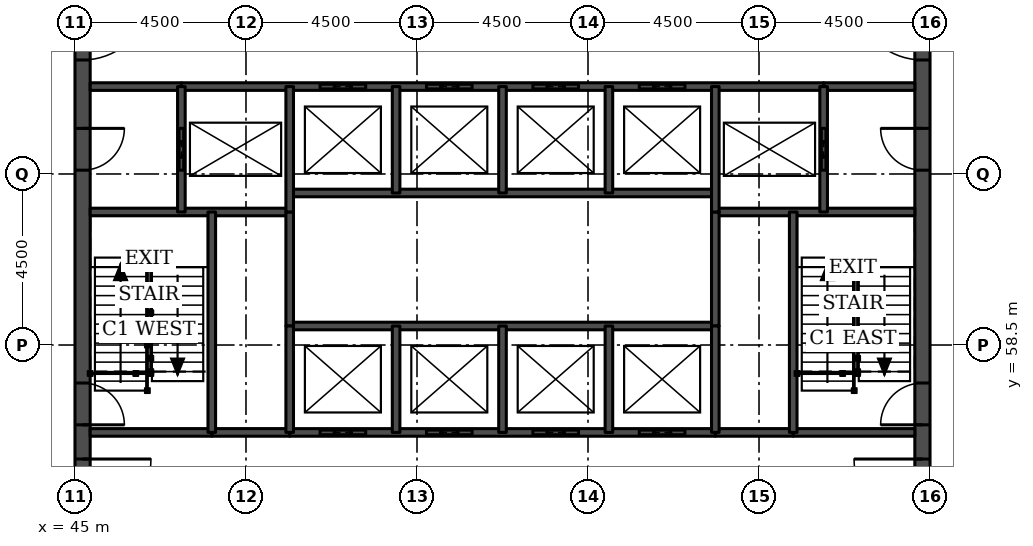
"""IFC4 building model, lengths in metres.
Left out: names, types, materials, properties, quantities, classifications, styles, units other than length and angle.
Written with IfcOpenShell. Run it as: python <this file> out.ifc"""

import sys

from ifc_helpers import new_model, si_unit, direction, frame, frame_2d, origin, place, context, subcontext, project, spatial, rectangle, extrude, element, fill, save


model = new_model("IFC4")
c1 = context("Model", 3, precision=1e-05, world=origin(), true_north=direction((0.0, 1.0)))
c2 = subcontext(c1, "Body", "Model", "MODEL_VIEW")
j1 = project(units=[si_unit("LENGTHUNIT", "METRE"), si_unit("PLANEANGLEUNIT", "RADIAN")], contexts=[c1])
p1 = place(None, origin())
s1 = spatial("IfcSite", under=j1, at=p1, CompositionType="ELEMENT")
p2 = place(p1, origin())
s2 = spatial("IfcBuilding", under=s1, at=p2, CompositionType="ELEMENT")
p3 = place(p2, frame((0.0, 0.0, 203.2)))
s3 = spatial("IfcBuildingStorey", under=s2, at=p3, CompositionType="ELEMENT", Elevation=203.2)
p4 = place(p3, frame((45.2, 49.5, 0.0), z_axis=(0.0, 0.0, 1.0), x_axis=(0.0, 1.0, 0.0)))
e1 = element("IfcWall", 1, at=p4, inside=s3, PredefinedType="SHEAR", context=c2, shape_type="SweptSolid", body=[
    extrude(rectangle(XDim=22.5, YDim=0.4, at=frame_2d((11.25, 0.0))), origin(), (0.0, 0.0, 1.0), 3.7),
])
p5 = place(p4, frame((4.2, 0.0, 0.0)))
e2 = element("IfcOpeningElement", 2, at=p5, cuts=e1, PredefinedType="OPENING", context=c2, shape_type="SweptSolid", body=[
    extrude(rectangle(XDim=1.8, YDim=2.1, at=frame_2d((0.9, 1.05))), frame((0.0, 0.21, 0.0), z_axis=(0.0, -1.0, 0.0), x_axis=(1.0, 0.0, 0.0)), (0.0, 0.0, 1.0), 0.42),
])
p6 = place(p4, frame((6.9, 0.0, 0.0)))
e3 = element("IfcOpeningElement", 3, at=p6, cuts=e1, PredefinedType="OPENING", context=c2, shape_type="SweptSolid", body=[
    extrude(rectangle(XDim=1.1, YDim=2.1, at=frame_2d((0.55, 1.05))), frame((0.0, 0.21, 0.0), z_axis=(0.0, -1.0, 0.0), x_axis=(1.0, 0.0, 0.0)), (0.0, 0.0, 1.0), 0.42),
])
p7 = place(p4, frame((13.6, 0.0, 0.0)))
e4 = element("IfcOpeningElement", 4, at=p7, cuts=e1, PredefinedType="OPENING", context=c2, shape_type="SweptSolid", body=[
    extrude(rectangle(XDim=1.1, YDim=2.1, at=frame_2d((0.55, 1.05))), frame((0.0, 0.21, 0.0), z_axis=(0.0, -1.0, 0.0), x_axis=(1.0, 0.0, 0.0)), (0.0, 0.0, 1.0), 0.42),
])
p8 = place(p4, frame((16.5, 0.0, 0.0)))
e5 = element("IfcOpeningElement", 5, at=p8, cuts=e1, PredefinedType="OPENING", context=c2, shape_type="SweptSolid", body=[
    extrude(rectangle(XDim=1.8, YDim=2.1, at=frame_2d((0.9, 1.05))), frame((0.0, 0.21, 0.0), z_axis=(0.0, -1.0, 0.0), x_axis=(1.0, 0.0, 0.0)), (0.0, 0.0, 1.0), 0.42),
])
p9 = place(p3, frame((67.3, 49.5, 0.0), z_axis=(0.0, 0.0, 1.0), x_axis=(0.0, 1.0, 0.0)))
e6 = element("IfcWall", 6, at=p9, inside=s3, PredefinedType="SHEAR", context=c2, shape_type="SweptSolid", body=[
    extrude(rectangle(XDim=22.5, YDim=0.4, at=frame_2d((11.25, 0.0))), origin(), (0.0, 0.0, 1.0), 3.7),
])
p10 = place(p9, frame((4.2, 0.0, 0.0)))
e7 = element("IfcOpeningElement", 7, at=p10, cuts=e6, PredefinedType="OPENING", context=c2, shape_type="SweptSolid", body=[
    extrude(rectangle(XDim=1.8, YDim=2.1, at=frame_2d((0.9, 1.05))), frame((0.0, 0.21, 0.0), z_axis=(0.0, -1.0, 0.0), x_axis=(1.0, 0.0, 0.0)), (0.0, 0.0, 1.0), 0.42),
])
p11 = place(p9, frame((6.9, 0.0, 0.0)))
e8 = element("IfcOpeningElement", 8, at=p11, cuts=e6, PredefinedType="OPENING", context=c2, shape_type="SweptSolid", body=[
    extrude(rectangle(XDim=1.1, YDim=2.1, at=frame_2d((0.55, 1.05))), frame((0.0, 0.21, 0.0), z_axis=(0.0, -1.0, 0.0), x_axis=(1.0, 0.0, 0.0)), (0.0, 0.0, 1.0), 0.42),
])
p12 = place(p9, frame((13.6, 0.0, 0.0)))
e9 = element("IfcOpeningElement", 9, at=p12, cuts=e6, PredefinedType="OPENING", context=c2, shape_type="SweptSolid", body=[
    extrude(rectangle(XDim=1.1, YDim=2.1, at=frame_2d((0.55, 1.05))), frame((0.0, 0.21, 0.0), z_axis=(0.0, -1.0, 0.0), x_axis=(1.0, 0.0, 0.0)), (0.0, 0.0, 1.0), 0.42),
])
p13 = place(p9, frame((16.5, 0.0, 0.0)))
e10 = element("IfcOpeningElement", 10, at=p13, cuts=e6, PredefinedType="OPENING", context=c2, shape_type="SweptSolid", body=[
    extrude(rectangle(XDim=1.8, YDim=2.1, at=frame_2d((0.9, 1.05))), frame((0.0, 0.21, 0.0), z_axis=(0.0, -1.0, 0.0), x_axis=(1.0, 0.0, 0.0)), (0.0, 0.0, 1.0), 0.42),
])
for number, where, z_axis, x_axis in (
    (11, (48.6, 56.2, 0.0), (0.0, 0.0, 1.0), (1.0, 0.0, 0.0)),
    (12, (61.85, 56.2, 0.0), (0.0, 0.0, 1.0), (1.0, 0.0, 0.0)),
):
    element("IfcWall", number, at=place(p3, frame(where, z_axis=z_axis, x_axis=x_axis)), inside=s3, PredefinedType="SOLIDWALL", context=c2, shape_type="SweptSolid", body=[
        extrude(rectangle(XDim=2.05, YDim=0.2, at=frame_2d((1.025, 0.0))), origin(), (0.0, 0.0, 1.0), 3.55),
    ])
p14 = place(p3, frame((45.4, 56.2, 0.0), z_axis=(0.0, 0.0, 1.0), x_axis=(1.0, 0.0, 0.0)))
e13 = element("IfcWall", 13, at=p14, inside=s3, PredefinedType="SOLIDWALL", context=c2, shape_type="SweptSolid", body=[
    extrude(rectangle(XDim=3.2, YDim=0.2, at=frame_2d((1.6, 0.0))), origin(), (0.0, 0.0, 1.0), 3.55),
])
p15 = place(p3, frame((50.65, 56.2, 0.0), z_axis=(0.0, 0.0, 1.0), x_axis=(1.0, 0.0, 0.0)))
e14 = element("IfcWall", 14, at=p15, inside=s3, PredefinedType="SOLIDWALL", context=c2, shape_type="SweptSolid", body=[
    extrude(rectangle(XDim=11.2, YDim=0.2, at=frame_2d((5.6, 0.0))), origin(), (0.0, 0.0, 1.0), 3.55),
])
p16 = place(p15, frame((0.8, 0.0, 0.0)))
e15 = element("IfcOpeningElement", 15, at=p16, cuts=e14, PredefinedType="OPENING", context=c2, shape_type="SweptSolid", body=[
    extrude(rectangle(XDim=1.2, YDim=2.1, at=frame_2d((0.6, 1.05))), frame((0.0, 0.11, 0.0), z_axis=(0.0, -1.0, 0.0), x_axis=(1.0, 0.0, 0.0)), (0.0, 0.0, 1.0), 0.22),
])
p17 = place(p15, frame((3.6, 0.0, 0.0)))
e16 = element("IfcOpeningElement", 16, at=p17, cuts=e14, PredefinedType="OPENING", context=c2, shape_type="SweptSolid", body=[
    extrude(rectangle(XDim=1.2, YDim=2.1, at=frame_2d((0.6, 1.05))), frame((0.0, 0.11, 0.0), z_axis=(0.0, -1.0, 0.0), x_axis=(1.0, 0.0, 0.0)), (0.0, 0.0, 1.0), 0.22),
])
p18 = place(p15, frame((6.4, 0.0, 0.0)))
e17 = element("IfcOpeningElement", 17, at=p18, cuts=e14, PredefinedType="OPENING", context=c2, shape_type="SweptSolid", body=[
    extrude(rectangle(XDim=1.2, YDim=2.1, at=frame_2d((0.6, 1.05))), frame((0.0, 0.11, 0.0), z_axis=(0.0, -1.0, 0.0), x_axis=(1.0, 0.0, 0.0)), (0.0, 0.0, 1.0), 0.22),
])
p19 = place(p15, frame((9.2, 0.0, 0.0)))
e18 = element("IfcOpeningElement", 18, at=p19, cuts=e14, PredefinedType="OPENING", context=c2, shape_type="SweptSolid", body=[
    extrude(rectangle(XDim=1.2, YDim=2.1, at=frame_2d((0.6, 1.05))), frame((0.0, 0.11, 0.0), z_axis=(0.0, -1.0, 0.0), x_axis=(1.0, 0.0, 0.0)), (0.0, 0.0, 1.0), 0.22),
])
p20 = place(p3, frame((63.9, 56.2, 0.0), z_axis=(0.0, 0.0, 1.0), x_axis=(1.0, 0.0, 0.0)))
e19 = element("IfcWall", 19, at=p20, inside=s3, PredefinedType="SOLIDWALL", context=c2, shape_type="SweptSolid", body=[
    extrude(rectangle(XDim=3.2, YDim=0.2, at=frame_2d((1.6, 0.0))), origin(), (0.0, 0.0, 1.0), 3.55),
])
p21 = place(p3, frame((50.65, 59.0, 0.0), z_axis=(0.0, 0.0, 1.0), x_axis=(1.0, 0.0, 0.0)))
e20 = element("IfcWall", 20, at=p21, inside=s3, PredefinedType="SOLIDWALL", context=c2, shape_type="SweptSolid", body=[
    extrude(rectangle(XDim=11.2, YDim=0.2, at=frame_2d((5.6, 0.0))), origin(), (0.0, 0.0, 1.0), 3.7),
])
for number, where, z_axis, x_axis in (
    (21, (45.4, 62.0, 0.0), (0.0, 0.0, 1.0), (1.0, 0.0, 0.0)),
    (22, (61.85, 62.0, 0.0), (0.0, 0.0, 1.0), (1.0, 0.0, 0.0)),
):
    element("IfcWall", number, at=place(p3, frame(where, z_axis=z_axis, x_axis=x_axis)), inside=s3, PredefinedType="SOLIDWALL", context=c2, shape_type="SweptSolid", body=[
        extrude(rectangle(XDim=5.25, YDim=0.2, at=frame_2d((2.625, 0.0))), origin(), (0.0, 0.0, 1.0), 3.55),
    ])
p22 = place(p3, frame((50.65, 62.5, 0.0), z_axis=(0.0, 0.0, 1.0), x_axis=(1.0, 0.0, 0.0)))
e23 = element("IfcWall", 23, at=p22, inside=s3, PredefinedType="SOLIDWALL", context=c2, shape_type="SweptSolid", body=[
    extrude(rectangle(XDim=11.2, YDim=0.2, at=frame_2d((5.6, 0.0))), origin(), (0.0, 0.0, 1.0), 3.7),
])
for number, where, z_axis, x_axis in (
    (24, (45.4, 65.3, 0.0), (0.0, 0.0, 1.0), (1.0, 0.0, 0.0)),
    (25, (64.7, 65.3, 0.0), (0.0, 0.0, 1.0), (1.0, 0.0, 0.0)),
):
    element("IfcWall", number, at=place(p3, frame(where, z_axis=z_axis, x_axis=x_axis)), inside=s3, PredefinedType="SOLIDWALL", context=c2, shape_type="SweptSolid", body=[
        extrude(rectangle(XDim=2.4, YDim=0.2, at=frame_2d((1.2, 0.0))), origin(), (0.0, 0.0, 1.0), 3.55),
    ])
p23 = place(p3, frame((47.8, 65.3, 0.0), z_axis=(0.0, 0.0, 1.0), x_axis=(1.0, 0.0, 0.0)))
e26 = element("IfcWall", 26, at=p23, inside=s3, PredefinedType="SOLIDWALL", context=c2, shape_type="SweptSolid", body=[
    extrude(rectangle(XDim=16.9, YDim=0.2, at=frame_2d((8.45, 0.0))), origin(), (0.0, 0.0, 1.0), 3.55),
])
p24 = place(p23, frame((3.65, 0.0, 0.0)))
e27 = element("IfcOpeningElement", 27, at=p24, cuts=e26, PredefinedType="OPENING", context=c2, shape_type="SweptSolid", body=[
    extrude(rectangle(XDim=1.2, YDim=2.1, at=frame_2d((0.6, 1.05))), frame((0.0, 0.11, 0.0), z_axis=(0.0, -1.0, 0.0), x_axis=(1.0, 0.0, 0.0)), (0.0, 0.0, 1.0), 0.22),
])
p25 = place(p23, frame((6.45, 0.0, 0.0)))
e28 = element("IfcOpeningElement", 28, at=p25, cuts=e26, PredefinedType="OPENING", context=c2, shape_type="SweptSolid", body=[
    extrude(rectangle(XDim=1.2, YDim=2.1, at=frame_2d((0.6, 1.05))), frame((0.0, 0.11, 0.0), z_axis=(0.0, -1.0, 0.0), x_axis=(1.0, 0.0, 0.0)), (0.0, 0.0, 1.0), 0.22),
])
p26 = place(p23, frame((9.25, 0.0, 0.0)))
e29 = element("IfcOpeningElement", 29, at=p26, cuts=e26, PredefinedType="OPENING", context=c2, shape_type="SweptSolid", body=[
    extrude(rectangle(XDim=1.2, YDim=2.1, at=frame_2d((0.6, 1.05))), frame((0.0, 0.11, 0.0), z_axis=(0.0, -1.0, 0.0), x_axis=(1.0, 0.0, 0.0)), (0.0, 0.0, 1.0), 0.22),
])
p27 = place(p23, frame((12.05, 0.0, 0.0)))
e30 = element("IfcOpeningElement", 30, at=p27, cuts=e26, PredefinedType="OPENING", context=c2, shape_type="SweptSolid", body=[
    extrude(rectangle(XDim=1.2, YDim=2.1, at=frame_2d((0.6, 1.05))), frame((0.0, 0.11, 0.0), z_axis=(0.0, -1.0, 0.0), x_axis=(1.0, 0.0, 0.0)), (0.0, 0.0, 1.0), 0.22),
])
p28 = place(p3, frame((47.8, 62.0, 0.0), z_axis=(0.0, 0.0, 1.0), x_axis=(0.0, 1.0, 0.0)))
e31 = element("IfcWall", 31, at=p28, inside=s3, PredefinedType="SOLIDWALL", context=c2, shape_type="SweptSolid", body=[
    extrude(rectangle(XDim=3.3, YDim=0.2, at=frame_2d((1.65, 0.0))), origin(), (0.0, 0.0, 1.0), 3.55),
])
p29 = place(p28, frame((1.1, 0.0, 0.0)))
e32 = element("IfcOpeningElement", 32, at=p29, cuts=e31, PredefinedType="OPENING", context=c2, shape_type="SweptSolid", body=[
    extrude(rectangle(XDim=1.1, YDim=2.1, at=frame_2d((0.55, 1.05))), frame((0.0, 0.11, 0.0), z_axis=(0.0, -1.0, 0.0), x_axis=(1.0, 0.0, 0.0)), (0.0, 0.0, 1.0), 0.22),
])
p30 = place(p3, frame((48.6, 56.2, 0.0), z_axis=(0.0, 0.0, 1.0), x_axis=(0.0, 1.0, 0.0)))
e33 = element("IfcWall", 33, at=p30, inside=s3, PredefinedType="SOLIDWALL", context=c2, shape_type="SweptSolid", body=[
    extrude(rectangle(XDim=5.8, YDim=0.2, at=frame_2d((2.9, 0.0))), origin(), (0.0, 0.0, 1.0), 3.55),
])
p31 = place(p3, frame((50.65, 59.0, 0.0), z_axis=(0.0, 0.0, 1.0), x_axis=(0.0, 1.0, 0.0)))
e34 = element("IfcWall", 34, at=p31, inside=s3, PredefinedType="SOLIDWALL", context=c2, shape_type="SweptSolid", body=[
    extrude(rectangle(XDim=3.0, YDim=0.2, at=frame_2d((1.5, 0.0))), origin(), (0.0, 0.0, 1.0), 3.7),
])
p32 = place(p3, frame((50.65, 56.2, 0.0), z_axis=(0.0, 0.0, 1.0), x_axis=(0.0, 1.0, 0.0)))
e35 = element("IfcWall", 35, at=p32, inside=s3, PredefinedType="SOLIDWALL", context=c2, shape_type="SweptSolid", body=[
    extrude(rectangle(XDim=2.8, YDim=0.2, at=frame_2d((1.4, 0.0))), origin(), (0.0, 0.0, 1.0), 3.55),
])
p33 = place(p3, frame((50.65, 62.0, 0.0), z_axis=(0.0, 0.0, 1.0), x_axis=(0.0, 1.0, 0.0)))
e36 = element("IfcWall", 36, at=p33, inside=s3, PredefinedType="SOLIDWALL", context=c2, shape_type="SweptSolid", body=[
    extrude(rectangle(XDim=3.3, YDim=0.2, at=frame_2d((1.65, 0.0))), origin(), (0.0, 0.0, 1.0), 3.55),
])
for number, where, z_axis, x_axis in (
    (37, (53.45, 56.2, 0.0), (0.0, 0.0, 1.0), (0.0, 1.0, 0.0)),
    (38, (53.45, 62.5, 0.0), (0.0, 0.0, 1.0), (0.0, 1.0, 0.0)),
    (39, (56.25, 56.2, 0.0), (0.0, 0.0, 1.0), (0.0, 1.0, 0.0)),
    (40, (56.25, 62.5, 0.0), (0.0, 0.0, 1.0), (0.0, 1.0, 0.0)),
    (41, (59.05, 56.2, 0.0), (0.0, 0.0, 1.0), (0.0, 1.0, 0.0)),
    (42, (59.05, 62.5, 0.0), (0.0, 0.0, 1.0), (0.0, 1.0, 0.0)),
):
    element("IfcWall", number, at=place(p3, frame(where, z_axis=z_axis, x_axis=x_axis)), inside=s3, PredefinedType="SOLIDWALL", context=c2, shape_type="SweptSolid", body=[
        extrude(rectangle(XDim=2.8, YDim=0.2, at=frame_2d((1.4, 0.0))), origin(), (0.0, 0.0, 1.0), 3.55),
    ])
p34 = place(p3, frame((61.85, 59.0, 0.0), z_axis=(0.0, 0.0, 1.0), x_axis=(0.0, 1.0, 0.0)))
e43 = element("IfcWall", 43, at=p34, inside=s3, PredefinedType="SOLIDWALL", context=c2, shape_type="SweptSolid", body=[
    extrude(rectangle(XDim=3.0, YDim=0.2, at=frame_2d((1.5, 0.0))), origin(), (0.0, 0.0, 1.0), 3.7),
])
p35 = place(p3, frame((61.85, 56.2, 0.0), z_axis=(0.0, 0.0, 1.0), x_axis=(0.0, 1.0, 0.0)))
e44 = element("IfcWall", 44, at=p35, inside=s3, PredefinedType="SOLIDWALL", context=c2, shape_type="SweptSolid", body=[
    extrude(rectangle(XDim=2.8, YDim=0.2, at=frame_2d((1.4, 0.0))), origin(), (0.0, 0.0, 1.0), 3.55),
])
p36 = place(p3, frame((61.85, 62.0, 0.0), z_axis=(0.0, 0.0, 1.0), x_axis=(0.0, 1.0, 0.0)))
e45 = element("IfcWall", 45, at=p36, inside=s3, PredefinedType="SOLIDWALL", context=c2, shape_type="SweptSolid", body=[
    extrude(rectangle(XDim=3.3, YDim=0.2, at=frame_2d((1.65, 0.0))), origin(), (0.0, 0.0, 1.0), 3.55),
])
p37 = place(p3, frame((63.9, 56.2, 0.0), z_axis=(0.0, 0.0, 1.0), x_axis=(0.0, 1.0, 0.0)))
e46 = element("IfcWall", 46, at=p37, inside=s3, PredefinedType="SOLIDWALL", context=c2, shape_type="SweptSolid", body=[
    extrude(rectangle(XDim=5.8, YDim=0.2, at=frame_2d((2.9, 0.0))), origin(), (0.0, 0.0, 1.0), 3.55),
])
p38 = place(p3, frame((64.7, 62.0, 0.0), z_axis=(0.0, 0.0, 1.0), x_axis=(0.0, 1.0, 0.0)))
e47 = element("IfcWall", 47, at=p38, inside=s3, PredefinedType="SOLIDWALL", context=c2, shape_type="SweptSolid", body=[
    extrude(rectangle(XDim=3.3, YDim=0.2, at=frame_2d((1.65, 0.0))), origin(), (0.0, 0.0, 1.0), 3.55),
])
p39 = place(p38, frame((1.1, 0.0, 0.0)))
e48 = element("IfcOpeningElement", 48, at=p39, cuts=e47, PredefinedType="OPENING", context=c2, shape_type="SweptSolid", body=[
    extrude(rectangle(XDim=1.1, YDim=2.1, at=frame_2d((0.55, 1.05))), frame((0.0, 0.11, 0.0), z_axis=(0.0, -1.0, 0.0), x_axis=(1.0, 0.0, 0.0)), (0.0, 0.0, 1.0), 0.22),
])
p40 = place(p16, origin())
e49 = element("IfcDoor", 49, at=p40, inside=s3, OperationType="DOUBLE_DOOR_SLIDING", PredefinedType="DOOR", context=c2, shape_type="SweptSolid", body=[
    extrude(rectangle(XDim=1.2, YDim=2.1, at=frame_2d((0.6, 1.05))), frame((0.0, 0.025, 0.0), z_axis=(0.0, -1.0, 0.0), x_axis=(1.0, 0.0, 0.0)), (0.0, 0.0, 1.0), 0.05),
])
fill(e15, e49)
p41 = place(p17, origin())
e50 = element("IfcDoor", 50, at=p41, inside=s3, OperationType="DOUBLE_DOOR_SLIDING", PredefinedType="DOOR", context=c2, shape_type="SweptSolid", body=[
    extrude(rectangle(XDim=1.2, YDim=2.1, at=frame_2d((0.6, 1.05))), frame((0.0, 0.025, 0.0), z_axis=(0.0, -1.0, 0.0), x_axis=(1.0, 0.0, 0.0)), (0.0, 0.0, 1.0), 0.05),
])
fill(e16, e50)
p42 = place(p18, origin())
e51 = element("IfcDoor", 51, at=p42, inside=s3, OperationType="DOUBLE_DOOR_SLIDING", PredefinedType="DOOR", context=c2, shape_type="SweptSolid", body=[
    extrude(rectangle(XDim=1.2, YDim=2.1, at=frame_2d((0.6, 1.05))), frame((0.0, 0.025, 0.0), z_axis=(0.0, -1.0, 0.0), x_axis=(1.0, 0.0, 0.0)), (0.0, 0.0, 1.0), 0.05),
])
fill(e17, e51)
p43 = place(p19, origin())
e52 = element("IfcDoor", 52, at=p43, inside=s3, OperationType="DOUBLE_DOOR_SLIDING", PredefinedType="DOOR", context=c2, shape_type="SweptSolid", body=[
    extrude(rectangle(XDim=1.2, YDim=2.1, at=frame_2d((0.6, 1.05))), frame((0.0, 0.025, 0.0), z_axis=(0.0, -1.0, 0.0), x_axis=(1.0, 0.0, 0.0)), (0.0, 0.0, 1.0), 0.05),
])
fill(e18, e52)
p44 = place(p24, origin())
e53 = element("IfcDoor", 53, at=p44, inside=s3, OperationType="DOUBLE_DOOR_SLIDING", PredefinedType="DOOR", context=c2, shape_type="SweptSolid", body=[
    extrude(rectangle(XDim=1.2, YDim=2.1, at=frame_2d((0.6, 1.05))), frame((0.0, 0.025, 0.0), z_axis=(0.0, -1.0, 0.0), x_axis=(1.0, 0.0, 0.0)), (0.0, 0.0, 1.0), 0.05),
])
fill(e27, e53)
p45 = place(p25, origin())
e54 = element("IfcDoor", 54, at=p45, inside=s3, OperationType="DOUBLE_DOOR_SLIDING", PredefinedType="DOOR", context=c2, shape_type="SweptSolid", body=[
    extrude(rectangle(XDim=1.2, YDim=2.1, at=frame_2d((0.6, 1.05))), frame((0.0, 0.025, 0.0), z_axis=(0.0, -1.0, 0.0), x_axis=(1.0, 0.0, 0.0)), (0.0, 0.0, 1.0), 0.05),
])
fill(e28, e54)
p46 = place(p26, origin())
e55 = element("IfcDoor", 55, at=p46, inside=s3, OperationType="DOUBLE_DOOR_SLIDING", PredefinedType="DOOR", context=c2, shape_type="SweptSolid", body=[
    extrude(rectangle(XDim=1.2, YDim=2.1, at=frame_2d((0.6, 1.05))), frame((0.0, 0.025, 0.0), z_axis=(0.0, -1.0, 0.0), x_axis=(1.0, 0.0, 0.0)), (0.0, 0.0, 1.0), 0.05),
])
fill(e29, e55)
p47 = place(p27, origin())
e56 = element("IfcDoor", 56, at=p47, inside=s3, OperationType="DOUBLE_DOOR_SLIDING", PredefinedType="DOOR", context=c2, shape_type="SweptSolid", body=[
    extrude(rectangle(XDim=1.2, YDim=2.1, at=frame_2d((0.6, 1.05))), frame((0.0, 0.025, 0.0), z_axis=(0.0, -1.0, 0.0), x_axis=(1.0, 0.0, 0.0)), (0.0, 0.0, 1.0), 0.05),
])
fill(e30, e56)
p48 = place(p29, origin())
e57 = element("IfcDoor", 57, at=p48, inside=s3, OperationType="DOUBLE_DOOR_SLIDING", PredefinedType="DOOR", context=c2, shape_type="SweptSolid", body=[
    extrude(rectangle(XDim=1.1, YDim=2.1, at=frame_2d((0.55, 1.05))), frame((0.0, 0.025, 0.0), z_axis=(0.0, -1.0, 0.0), x_axis=(1.0, 0.0, 0.0)), (0.0, 0.0, 1.0), 0.05),
])
fill(e32, e57)
p49 = place(p39, origin())
e58 = element("IfcDoor", 58, at=p49, inside=s3, OperationType="DOUBLE_DOOR_SLIDING", PredefinedType="DOOR", context=c2, shape_type="SweptSolid", body=[
    extrude(rectangle(XDim=1.1, YDim=2.1, at=frame_2d((0.55, 1.05))), frame((0.0, 0.025, 0.0), z_axis=(0.0, -1.0, 0.0), x_axis=(1.0, 0.0, 0.0)), (0.0, 0.0, 1.0), 0.05),
])
fill(e48, e58)
p50 = place(p5, frame((1.8, 0.0, 0.0), z_axis=(0.0, 0.0, 1.0), x_axis=(-1.0, 0.0, 0.0)))
e59 = element("IfcDoor", 59, at=p50, inside=s3, OperationType="SINGLE_SWING_LEFT", PredefinedType="DOOR", context=c2, shape_type="SweptSolid", body=[
    extrude(rectangle(XDim=1.8, YDim=2.1, at=frame_2d((0.9, 1.05))), frame((0.0, 0.025, 0.0), z_axis=(0.0, -1.0, 0.0), x_axis=(1.0, 0.0, 0.0)), (0.0, 0.0, 1.0), 0.05),
])
fill(e2, e59)
p51 = place(p6, frame((1.1, 0.0, 0.0), z_axis=(0.0, 0.0, 1.0), x_axis=(-1.0, 0.0, 0.0)))
e60 = element("IfcDoor", 60, at=p51, inside=s3, OperationType="SINGLE_SWING_RIGHT", PredefinedType="DOOR", context=c2, shape_type="SweptSolid", body=[
    extrude(rectangle(XDim=1.1, YDim=2.1, at=frame_2d((0.55, 1.05))), frame((0.0, 0.025, 0.0), z_axis=(0.0, -1.0, 0.0), x_axis=(1.0, 0.0, 0.0)), (0.0, 0.0, 1.0), 0.05),
])
fill(e3, e60)
p52 = place(p7, frame((1.1, 0.0, 0.0), z_axis=(0.0, 0.0, 1.0), x_axis=(-1.0, 0.0, 0.0)))
e61 = element("IfcDoor", 61, at=p52, inside=s3, OperationType="SINGLE_SWING_LEFT", PredefinedType="DOOR", context=c2, shape_type="SweptSolid", body=[
    extrude(rectangle(XDim=1.1, YDim=2.1, at=frame_2d((0.55, 1.05))), frame((0.0, 0.025, 0.0), z_axis=(0.0, -1.0, 0.0), x_axis=(1.0, 0.0, 0.0)), (0.0, 0.0, 1.0), 0.05),
])
fill(e4, e61)
p53 = place(p8, frame((1.8, 0.0, 0.0), z_axis=(0.0, 0.0, 1.0), x_axis=(-1.0, 0.0, 0.0)))
e62 = element("IfcDoor", 62, at=p53, inside=s3, OperationType="SINGLE_SWING_LEFT", PredefinedType="DOOR", context=c2, shape_type="SweptSolid", body=[
    extrude(rectangle(XDim=1.8, YDim=2.1, at=frame_2d((0.9, 1.05))), frame((0.0, 0.025, 0.0), z_axis=(0.0, -1.0, 0.0), x_axis=(1.0, 0.0, 0.0)), (0.0, 0.0, 1.0), 0.05),
])
fill(e5, e62)
p54 = place(p10, origin())
e63 = element("IfcDoor", 63, at=p54, inside=s3, OperationType="SINGLE_SWING_RIGHT", PredefinedType="DOOR", context=c2, shape_type="SweptSolid", body=[
    extrude(rectangle(XDim=1.8, YDim=2.1, at=frame_2d((0.9, 1.05))), frame((0.0, 0.025, 0.0), z_axis=(0.0, -1.0, 0.0), x_axis=(1.0, 0.0, 0.0)), (0.0, 0.0, 1.0), 0.05),
])
fill(e7, e63)
p55 = place(p11, origin())
e64 = element("IfcDoor", 64, at=p55, inside=s3, OperationType="SINGLE_SWING_LEFT", PredefinedType="DOOR", context=c2, shape_type="SweptSolid", body=[
    extrude(rectangle(XDim=1.1, YDim=2.1, at=frame_2d((0.55, 1.05))), frame((0.0, 0.025, 0.0), z_axis=(0.0, -1.0, 0.0), x_axis=(1.0, 0.0, 0.0)), (0.0, 0.0, 1.0), 0.05),
])
fill(e8, e64)
p56 = place(p12, origin())
e65 = element("IfcDoor", 65, at=p56, inside=s3, OperationType="SINGLE_SWING_RIGHT", PredefinedType="DOOR", context=c2, shape_type="SweptSolid", body=[
    extrude(rectangle(XDim=1.1, YDim=2.1, at=frame_2d((0.55, 1.05))), frame((0.0, 0.025, 0.0), z_axis=(0.0, -1.0, 0.0), x_axis=(1.0, 0.0, 0.0)), (0.0, 0.0, 1.0), 0.05),
])
fill(e9, e65)
p57 = place(p13, origin())
e66 = element("IfcDoor", 66, at=p57, inside=s3, OperationType="SINGLE_SWING_RIGHT", PredefinedType="DOOR", context=c2, shape_type="SweptSolid", body=[
    extrude(rectangle(XDim=1.8, YDim=2.1, at=frame_2d((0.9, 1.05))), frame((0.0, 0.025, 0.0), z_axis=(0.0, -1.0, 0.0), x_axis=(1.0, 0.0, 0.0)), (0.0, 0.0, 1.0), 0.05),
])
fill(e10, e66)
save(model, sys.argv[1])
